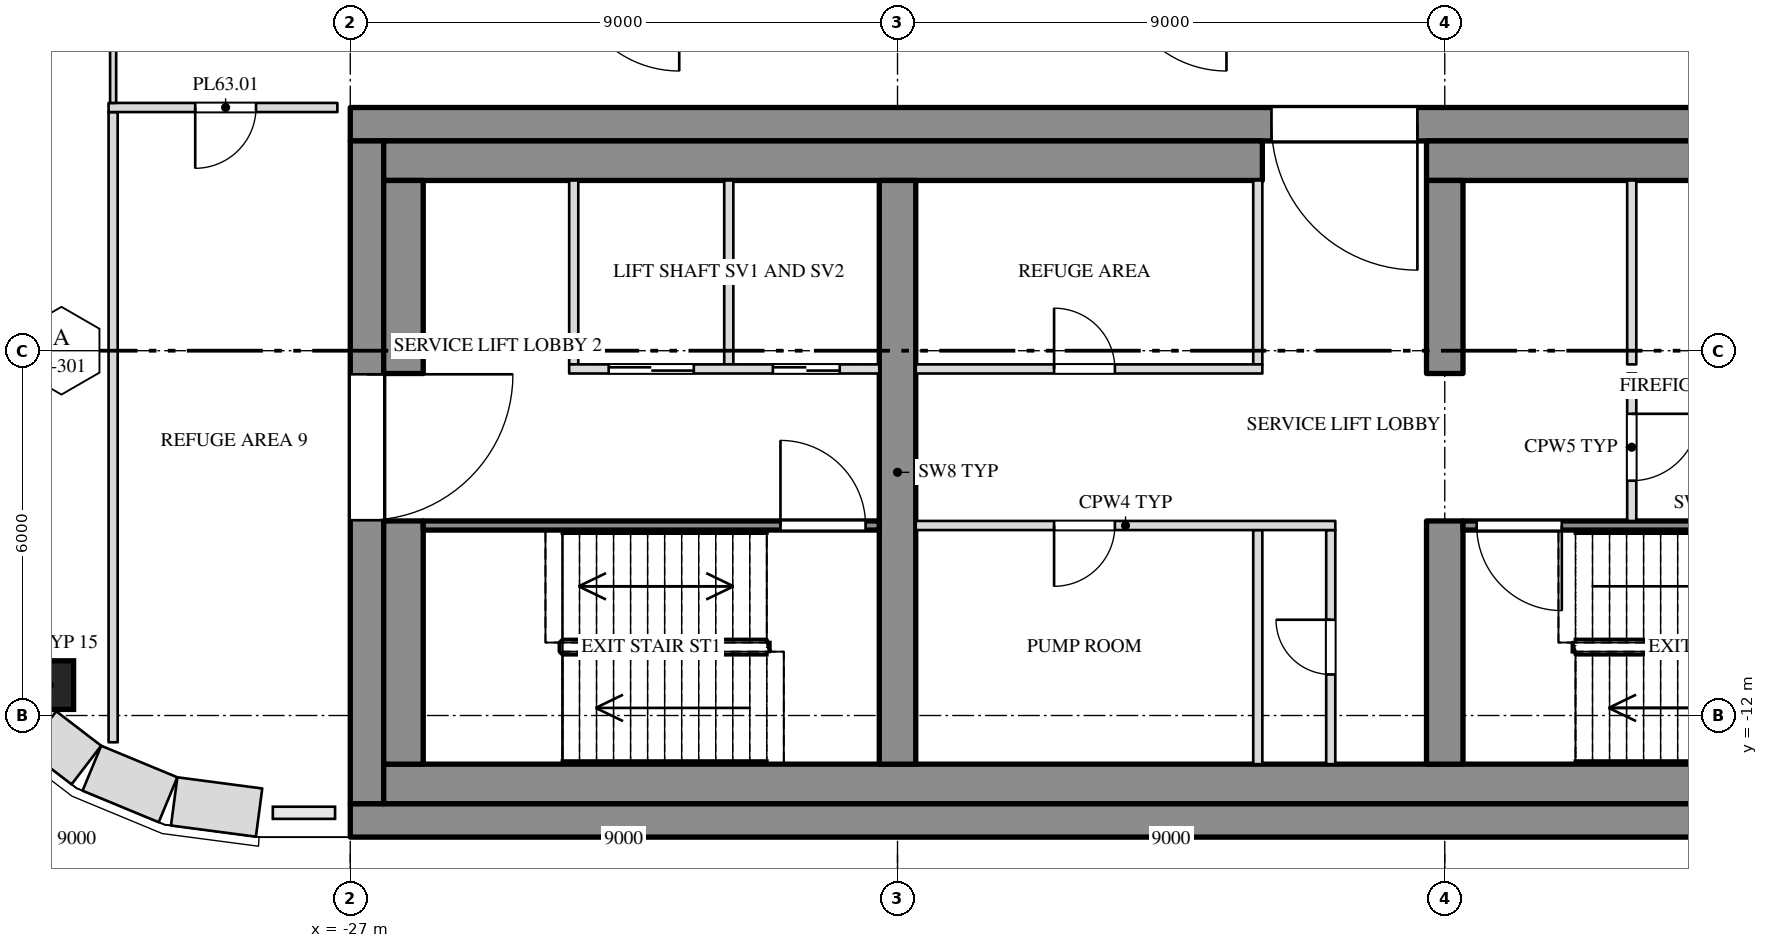
"""IFC4 building model, lengths in metres.
Left out: names, types, materials, properties, quantities, classifications, styles, units other than length and angle.
Written with IfcOpenShell. Run it as: python <this file> out.ifc"""

import sys

from ifc_helpers import new_model, si_unit, direction, frame, frame_2d, origin, origin_2d, place, context, subcontext, project, spatial, rectangle, extrude, element, fill, save


model = new_model("IFC4")
c1 = context("Model", 3, precision=1e-05, world=origin(), true_north=direction((0.0, 1.0)))
c2 = subcontext(c1, "Body", "Model", "MODEL_VIEW")
j1 = project(units=[si_unit("LENGTHUNIT", "METRE"), si_unit("PLANEANGLEUNIT", "RADIAN")], contexts=[c1])
p1 = place(None, origin())
s1 = spatial("IfcSite", under=j1, at=p1, CompositionType="ELEMENT")
p2 = place(p1, origin())
s2 = spatial("IfcBuilding", under=s1, at=p2, CompositionType="ELEMENT")
p3 = place(p2, frame((0.0, 0.0, 268.5)))
s3 = spatial("IfcBuildingStorey", under=s2, at=p3, CompositionType="ELEMENT", Elevation=268.5)
p4 = place(p3, frame((-31.95, -11.5, 0.0), z_axis=(0.0, 0.0, 1.0), x_axis=(1.0, 0.0, 0.0)))
e1 = element("IfcColumn", 1, at=p4, inside=s3, PredefinedType="COLUMN", context=c2, shape_type="SweptSolid", body=[
    extrude(rectangle(XDim=0.8, YDim=0.8, at=origin_2d()), origin(), (0.0, 0.0, 1.0), 4.0),
])
p5 = place(p3, frame((-27.0, -2.275, 0.0), z_axis=(0.0, 0.0, 1.0), x_axis=(1.0, 0.0, 0.0)))
e2 = element("IfcWall", 2, at=p5, inside=s3, PredefinedType="SHEAR", context=c2, shape_type="SweptSolid", body=[
    extrude(rectangle(XDim=54.0, YDim=0.55, at=frame_2d((27.0, 0.0))), origin(), (0.0, 0.0, 1.0), 3.78),
])
p6 = place(p5, frame((15.15, 0.0, 0.0)))
e3 = element("IfcOpeningElement", 3, at=p6, cuts=e2, PredefinedType="OPENING", context=c2, shape_type="SweptSolid", body=[
    extrude(rectangle(XDim=2.4, YDim=2.1, at=frame_2d((1.2, 1.05))), frame((0.0, 0.287, 0.0), z_axis=(0.0, -1.0, 0.0), x_axis=(1.0, 0.0, 0.0)), (0.0, 0.0, 1.0), 0.574),
])
p7 = place(p5, frame((36.45, 0.0, 0.0)))
e4 = element("IfcOpeningElement", 4, at=p7, cuts=e2, PredefinedType="OPENING", context=c2, shape_type="SweptSolid", body=[
    extrude(rectangle(XDim=2.4, YDim=2.1, at=frame_2d((1.2, 1.05))), frame((0.0, 0.287, 0.0), z_axis=(0.0, -1.0, 0.0), x_axis=(1.0, 0.0, 0.0)), (0.0, 0.0, 1.0), 0.574),
])
p8 = place(p3, frame((-27.0, -13.725, 0.0), z_axis=(0.0, 0.0, 1.0), x_axis=(1.0, 0.0, 0.0)))
e5 = element("IfcWall", 5, at=p8, inside=s3, PredefinedType="SHEAR", context=c2, shape_type="SweptSolid", body=[
    extrude(rectangle(XDim=54.0, YDim=0.55, at=frame_2d((27.0, 0.0))), origin(), (0.0, 0.0, 1.0), 3.78),
])
p9 = place(p3, frame((-26.725, -13.45, 0.0), z_axis=(0.0, 0.0, 1.0), x_axis=(0.0, 1.0, 0.0)))
e6 = element("IfcWall", 6, at=p9, inside=s3, PredefinedType="SHEAR", context=c2, shape_type="SweptSolid", body=[
    extrude(rectangle(XDim=10.9, YDim=0.55, at=frame_2d((5.45, 0.0))), origin(), (0.0, 0.0, 1.0), 3.78),
])
p10 = place(p9, frame((4.662, 0.0, 0.0)))
e7 = element("IfcOpeningElement", 7, at=p10, cuts=e6, PredefinedType="OPENING", context=c2, shape_type="SweptSolid", body=[
    extrude(rectangle(XDim=2.4, YDim=2.1, at=frame_2d((1.2, 1.05))), frame((0.0, 0.287, 0.0), z_axis=(0.0, -1.0, 0.0), x_axis=(1.0, 0.0, 0.0)), (0.0, 0.0, 1.0), 0.574),
])
p11 = place(p3, frame((-26.45, -2.875, 0.0), z_axis=(0.0, 0.0, 1.0), x_axis=(1.0, 0.0, 0.0)))
e8 = element("IfcWall", 8, at=p11, inside=s3, PredefinedType="SHEAR", context=c2, shape_type="SweptSolid", body=[
    extrude(rectangle(XDim=14.45, YDim=0.65, at=frame_2d((7.225, 0.0))), origin(), (0.0, 0.0, 1.0), 3.78),
])
p12 = place(p3, frame((-9.3, -2.875, 0.0), z_axis=(0.0, 0.0, 1.0), x_axis=(1.0, 0.0, 0.0)))
e9 = element("IfcWall", 9, at=p12, inside=s3, PredefinedType="SHEAR", context=c2, shape_type="SweptSolid", body=[
    extrude(rectangle(XDim=18.6, YDim=0.65, at=frame_2d((9.3, 0.0))), origin(), (0.0, 0.0, 1.0), 3.78),
])
p13 = place(p3, frame((-26.45, -13.125, 0.0), z_axis=(0.0, 0.0, 1.0), x_axis=(1.0, 0.0, 0.0)))
e10 = element("IfcWall", 10, at=p13, inside=s3, PredefinedType="SHEAR", context=c2, shape_type="SweptSolid", body=[
    extrude(rectangle(XDim=52.9, YDim=0.65, at=frame_2d((26.45, 0.0))), origin(), (0.0, 0.0, 1.0), 3.78),
])
p14 = place(p3, frame((-26.125, -12.8, 0.0), z_axis=(0.0, 0.0, 1.0), x_axis=(0.0, 1.0, 0.0)))
e11 = element("IfcWall", 11, at=p14, inside=s3, PredefinedType="SHEAR", context=c2, shape_type="SweptSolid", body=[
    extrude(rectangle(XDim=4.0, YDim=0.65, at=frame_2d((2.0, 0.0))), origin(), (0.0, 0.0, 1.0), 3.78),
])
p15 = place(p3, frame((-26.125, -6.375, 0.0), z_axis=(0.0, 0.0, 1.0), x_axis=(0.0, 1.0, 0.0)))
e12 = element("IfcWall", 12, at=p15, inside=s3, PredefinedType="SHEAR", context=c2, shape_type="SweptSolid", body=[
    extrude(rectangle(XDim=3.175, YDim=0.65, at=frame_2d((1.587, 0.0))), origin(), (0.0, 0.0, 1.0), 3.78),
])
p16 = place(p3, frame((-18.0, -12.8, 0.0), z_axis=(0.0, 0.0, 1.0), x_axis=(0.0, 1.0, 0.0)))
e13 = element("IfcWall", 13, at=p16, inside=s3, PredefinedType="SHEAR", context=c2, shape_type="SweptSolid", body=[
    extrude(rectangle(XDim=9.6, YDim=0.6, at=frame_2d((4.8, 0.0))), origin(), (0.0, 0.0, 1.0), 3.78),
])
p17 = place(p3, frame((-9.0, -12.8, 0.0), z_axis=(0.0, 0.0, 1.0), x_axis=(0.0, 1.0, 0.0)))
e14 = element("IfcWall", 14, at=p17, inside=s3, PredefinedType="SHEAR", context=c2, shape_type="SweptSolid", body=[
    extrude(rectangle(XDim=4.0, YDim=0.6, at=frame_2d((2.0, 0.0))), origin(), (0.0, 0.0, 1.0), 3.78),
])
p18 = place(p3, frame((-9.0, -6.375, 0.0), z_axis=(0.0, 0.0, 1.0), x_axis=(0.0, 1.0, 0.0)))
e15 = element("IfcWall", 15, at=p18, inside=s3, PredefinedType="SHEAR", context=c2, shape_type="SweptSolid", body=[
    extrude(rectangle(XDim=3.175, YDim=0.6, at=frame_2d((1.587, 0.0))), origin(), (0.0, 0.0, 1.0), 3.78),
])
p19 = place(p3, frame((-30.9, -12.44, 0.0), z_axis=(0.0, 0.0, 1.0), x_axis=(0.0, 1.0, 0.0)))
e16 = element("IfcWall", 16, at=p19, inside=s3, PredefinedType="PARTITIONING", context=c2, shape_type="SweptSolid", body=[
    extrude(rectangle(XDim=10.365, YDim=0.15, at=frame_2d((5.183, 0.0))), origin(), (0.0, 0.0, 1.0), 3.78),
])
p20 = place(p3, frame((-30.975, -2.0, 0.0), z_axis=(0.0, 0.0, 1.0), x_axis=(1.0, 0.0, 0.0)))
e17 = element("IfcWall", 17, at=p20, inside=s3, PredefinedType="PARTITIONING", context=c2, shape_type="SweptSolid", body=[
    extrude(rectangle(XDim=3.763, YDim=0.15, at=frame_2d((1.882, 0.0))), origin(), (0.0, 0.0, 1.0), 3.78),
])
p21 = place(p20, frame((1.425, 0.0, 0.0)))
e18 = element("IfcOpeningElement", 18, at=p21, cuts=e17, PredefinedType="OPENING", context=c2, shape_type="SweptSolid", body=[
    extrude(rectangle(XDim=1.0, YDim=2.1, at=frame_2d((0.5, 1.05))), frame((0.0, 0.087, 0.0), z_axis=(0.0, -1.0, 0.0), x_axis=(1.0, 0.0, 0.0)), (0.0, 0.0, 1.0), 0.174),
])
p22 = place(p3, frame((-30.9, -1.925, 0.0), z_axis=(0.0, 0.0, 1.0), x_axis=(0.0, 1.0, 0.0)))
e19 = element("IfcWall", 19, at=p22, inside=s3, PredefinedType="PARTITIONING", context=c2, shape_type="SweptSolid", body=[
    extrude(rectangle(XDim=2.25, YDim=0.1, at=frame_2d((1.125, 0.0))), origin(), (0.0, 0.0, 1.0), 3.78),
])
p23 = place(p3, frame((-32.079, -12.248, 0.0), z_axis=(0.0, 0.0, 1.0), x_axis=(0.793344662299, -0.608772738221, 0.0)))
e20 = element("IfcWall", 20, at=p23, inside=s3, PredefinedType="SOLIDWALL", context=c2, shape_type="SweptSolid", body=[
    extrude(rectangle(XDim=0.931, YDim=0.8, at=frame_2d((0.466, 0.0))), origin(), (0.0, 0.0, 1.0), 3.78),
])
p24 = place(p3, frame((-31.25, -12.867, 0.0), z_axis=(0.0, 0.0, 1.0), x_axis=(0.923847774587, -0.38276009378, 0.0)))
e21 = element("IfcWall", 21, at=p24, inside=s3, PredefinedType="SOLIDWALL", context=c2, shape_type="SweptSolid", body=[
    extrude(rectangle(XDim=1.355, YDim=0.8, at=frame_2d((0.678, 0.0))), origin(), (0.0, 0.0, 1.0), 3.78),
])
p25 = place(p3, frame((-29.896, -13.413, 0.0), z_axis=(0.0, 0.0, 1.0), x_axis=(0.99144603414, -0.130517283865, 0.0)))
e22 = element("IfcWall", 22, at=p25, inside=s3, PredefinedType="SOLIDWALL", context=c2, shape_type="SweptSolid", body=[
    extrude(rectangle(XDim=1.408, YDim=0.8, at=frame_2d((0.704, 0.0))), origin(), (0.0, 0.0, 1.0), 3.78),
])
for number, where, z_axis, x_axis in (
    (23, (-20.775, -6.225, 0.0), (0.0, 0.0, 1.0), (0.0, 1.0, 0.0)),
    (24, (-23.325, -6.225, 0.0), (0.0, 0.0, 1.0), (0.0, 1.0, 0.0)),
    (25, (-12.075, -6.225, 0.0), (0.0, 0.0, 1.0), (0.0, 1.0, 0.0)),
    (26, (-5.925, -6.225, 0.0), (0.0, 0.0, 1.0), (0.0, 1.0, 0.0)),
):
    element("IfcWall", number, at=place(p3, frame(where, z_axis=z_axis, x_axis=x_axis)), inside=s3, PredefinedType="PARTITIONING", context=c2, shape_type="SweptSolid", body=[
        extrude(rectangle(XDim=3.025, YDim=0.15, at=frame_2d((1.513, 0.0))), origin(), (0.0, 0.0, 1.0), 3.78),
    ])
p26 = place(p3, frame((-10.875, -12.8, 0.0), z_axis=(0.0, 0.0, 1.0), x_axis=(0.0, 1.0, 0.0)))
e27 = element("IfcWall", 27, at=p26, inside=s3, PredefinedType="PARTITIONING", context=c2, shape_type="SweptSolid", body=[
    extrude(rectangle(XDim=3.85, YDim=0.15, at=frame_2d((1.925, 0.0))), origin(), (0.0, 0.0, 1.0), 3.78),
])
p27 = place(p26, frame((1.475, 0.0, 0.0)))
e28 = element("IfcOpeningElement", 28, at=p27, cuts=e27, PredefinedType="OPENING", context=c2, shape_type="SweptSolid", body=[
    extrude(rectangle(XDim=0.9, YDim=2.1, at=frame_2d((0.45, 1.05))), frame((0.0, 0.087, 0.0), z_axis=(0.0, -1.0, 0.0), x_axis=(1.0, 0.0, 0.0)), (0.0, 0.0, 1.0), 0.174),
])
p28 = place(p3, frame((-12.075, -12.8, 0.0), z_axis=(0.0, 0.0, 1.0), x_axis=(0.0, 1.0, 0.0)))
e29 = element("IfcWall", 29, at=p28, inside=s3, PredefinedType="PARTITIONING", context=c2, shape_type="SweptSolid", body=[
    extrude(rectangle(XDim=3.85, YDim=0.15, at=frame_2d((1.925, 0.0))), origin(), (0.0, 0.0, 1.0), 3.78),
])
p29 = place(p3, frame((-5.925, -8.8, 0.0), z_axis=(0.0, 0.0, 1.0), x_axis=(0.0, 1.0, 0.0)))
e30 = element("IfcWall", 30, at=p29, inside=s3, PredefinedType="PARTITIONING", context=c2, shape_type="SweptSolid", body=[
    extrude(rectangle(XDim=2.425, YDim=0.15, at=frame_2d((1.212, 0.0))), origin(), (0.0, 0.0, 1.0), 3.78),
])
p30 = place(p29, frame((0.662, 0.0, 0.0)))
e31 = element("IfcOpeningElement", 31, at=p30, cuts=e30, PredefinedType="OPENING", context=c2, shape_type="SweptSolid", body=[
    extrude(rectangle(XDim=1.1, YDim=2.1, at=frame_2d((0.55, 1.05))), frame((0.0, 0.087, 0.0), z_axis=(0.0, -1.0, 0.0), x_axis=(1.0, 0.0, 0.0)), (0.0, 0.0, 1.0), 0.174),
])
p31 = place(p3, frame((-23.4, -6.3, 0.0), z_axis=(0.0, 0.0, 1.0), x_axis=(1.0, 0.0, 0.0)))
e32 = element("IfcWall", 32, at=p31, inside=s3, PredefinedType="PARTITIONING", context=c2, shape_type="SweptSolid", body=[
    extrude(rectangle(XDim=5.1, YDim=0.15, at=frame_2d((2.55, 0.0))), origin(), (0.0, 0.0, 1.0), 3.78),
])
p32 = place(p31, frame((0.65, 0.0, 0.0)))
e33 = element("IfcOpeningElement", 33, at=p32, cuts=e32, PredefinedType="OPENING", context=c2, shape_type="SweptSolid", body=[
    extrude(rectangle(XDim=1.4, YDim=2.1, at=frame_2d((0.7, 1.05))), frame((0.0, 0.087, 0.0), z_axis=(0.0, -1.0, 0.0), x_axis=(1.0, 0.0, 0.0)), (0.0, 0.0, 1.0), 0.174),
])
p33 = place(p31, frame((3.35, 0.0, 0.0)))
e34 = element("IfcOpeningElement", 34, at=p33, cuts=e32, PredefinedType="OPENING", context=c2, shape_type="SweptSolid", body=[
    extrude(rectangle(XDim=1.1, YDim=2.1, at=frame_2d((0.55, 1.05))), frame((0.0, 0.087, 0.0), z_axis=(0.0, -1.0, 0.0), x_axis=(1.0, 0.0, 0.0)), (0.0, 0.0, 1.0), 0.174),
])
p34 = place(p3, frame((-17.7, -6.3, 0.0), z_axis=(0.0, 0.0, 1.0), x_axis=(1.0, 0.0, 0.0)))
e35 = element("IfcWall", 35, at=p34, inside=s3, PredefinedType="PARTITIONING", context=c2, shape_type="SweptSolid", body=[
    extrude(rectangle(XDim=5.7, YDim=0.15, at=frame_2d((2.85, 0.0))), origin(), (0.0, 0.0, 1.0), 3.78),
])
p35 = place(p34, frame((2.275, 0.0, 0.0)))
e36 = element("IfcOpeningElement", 36, at=p35, cuts=e35, PredefinedType="OPENING", context=c2, shape_type="SweptSolid", body=[
    extrude(rectangle(XDim=1.0, YDim=2.1, at=frame_2d((0.5, 1.05))), frame((0.0, 0.087, 0.0), z_axis=(0.0, -1.0, 0.0), x_axis=(1.0, 0.0, 0.0)), (0.0, 0.0, 1.0), 0.174),
])
p36 = place(p3, frame((-25.8, -8.875, 0.0), z_axis=(0.0, 0.0, 1.0), x_axis=(1.0, 0.0, 0.0)))
e37 = element("IfcWall", 37, at=p36, inside=s3, PredefinedType="SHEAR", context=c2, shape_type="SweptSolid", body=[
    extrude(rectangle(XDim=7.5, YDim=0.15, at=frame_2d((3.75, 0.0))), origin(), (0.0, 0.0, 1.0), 3.78),
])
p37 = place(p36, frame((5.875, 0.0, 0.0)))
e38 = element("IfcOpeningElement", 38, at=p37, cuts=e37, PredefinedType="OPENING", context=c2, shape_type="SweptSolid", body=[
    extrude(rectangle(XDim=1.4, YDim=2.1, at=frame_2d((0.7, 1.05))), frame((0.0, 0.087, 0.0), z_axis=(0.0, -1.0, 0.0), x_axis=(1.0, 0.0, 0.0)), (0.0, 0.0, 1.0), 0.174),
])
p38 = place(p3, frame((-17.7, -8.875, 0.0), z_axis=(0.0, 0.0, 1.0), x_axis=(1.0, 0.0, 0.0)))
e39 = element("IfcWall", 39, at=p38, inside=s3, PredefinedType="PARTITIONING", context=c2, shape_type="SweptSolid", body=[
    extrude(rectangle(XDim=6.9, YDim=0.15, at=frame_2d((3.45, 0.0))), origin(), (0.0, 0.0, 1.0), 3.78),
])
p39 = place(p38, frame((2.275, 0.0, 0.0)))
e40 = element("IfcOpeningElement", 40, at=p39, cuts=e39, PredefinedType="OPENING", context=c2, shape_type="SweptSolid", body=[
    extrude(rectangle(XDim=1.0, YDim=2.1, at=frame_2d((0.5, 1.05))), frame((0.0, 0.087, 0.0), z_axis=(0.0, -1.0, 0.0), x_axis=(1.0, 0.0, 0.0)), (0.0, 0.0, 1.0), 0.174),
])
p40 = place(p3, frame((-8.7, -8.875, 0.0), z_axis=(0.0, 0.0, 1.0), x_axis=(1.0, 0.0, 0.0)))
e41 = element("IfcWall", 41, at=p40, inside=s3, PredefinedType="SHEAR", context=c2, shape_type="SweptSolid", body=[
    extrude(rectangle(XDim=8.4, YDim=0.15, at=frame_2d((4.2, 0.0))), origin(), (0.0, 0.0, 1.0), 3.78),
])
p41 = place(p40, frame((0.225, 0.0, 0.0)))
e42 = element("IfcOpeningElement", 42, at=p41, cuts=e41, PredefinedType="OPENING", context=c2, shape_type="SweptSolid", body=[
    extrude(rectangle(XDim=1.4, YDim=2.1, at=frame_2d((0.7, 1.05))), frame((0.0, 0.087, 0.0), z_axis=(0.0, -1.0, 0.0), x_axis=(1.0, 0.0, 0.0)), (0.0, 0.0, 1.0), 0.174),
])
p42 = place(p21, origin())
e43 = element("IfcDoor", 43, at=p42, inside=s3, OperationType="SINGLE_SWING_RIGHT", PredefinedType="DOOR", context=c2, shape_type="SweptSolid", body=[
    extrude(rectangle(XDim=1.0, YDim=2.1, at=frame_2d((0.5, 1.05))), frame((0.0, 0.025, 0.0), z_axis=(0.0, -1.0, 0.0), x_axis=(1.0, 0.0, 0.0)), (0.0, 0.0, 1.0), 0.05),
])
fill(e18, e43)
p43 = place(p10, origin())
e44 = element("IfcDoor", 44, at=p43, inside=s3, OperationType="DOUBLE_DOOR_SINGLE_SWING", PredefinedType="DOOR", context=c2, shape_type="SweptSolid", body=[
    extrude(rectangle(XDim=2.4, YDim=2.1, at=frame_2d((1.2, 1.05))), frame((0.0, 0.025, 0.0), z_axis=(0.0, -1.0, 0.0), x_axis=(1.0, 0.0, 0.0)), (0.0, 0.0, 1.0), 0.05),
])
fill(e7, e44)
p44 = place(p32, origin())
e45 = element("IfcDoor", 45, at=p44, inside=s3, OperationType="SLIDING_TO_RIGHT", PredefinedType="DOOR", context=c2, shape_type="SweptSolid", body=[
    extrude(rectangle(XDim=1.4, YDim=2.1, at=frame_2d((0.7, 1.05))), frame((0.0, 0.025, 0.0), z_axis=(0.0, -1.0, 0.0), x_axis=(1.0, 0.0, 0.0)), (0.0, 0.0, 1.0), 0.05),
])
fill(e33, e45)
p45 = place(p33, origin())
e46 = element("IfcDoor", 46, at=p45, inside=s3, OperationType="SLIDING_TO_LEFT", PredefinedType="DOOR", context=c2, shape_type="SweptSolid", body=[
    extrude(rectangle(XDim=1.1, YDim=2.1, at=frame_2d((0.55, 1.05))), frame((0.0, 0.025, 0.0), z_axis=(0.0, -1.0, 0.0), x_axis=(1.0, 0.0, 0.0)), (0.0, 0.0, 1.0), 0.05),
])
fill(e34, e46)
p46 = place(p37, origin())
e47 = element("IfcDoor", 47, at=p46, inside=s3, OperationType="DOUBLE_DOOR_SINGLE_SWING", PredefinedType="DOOR", context=c2, shape_type="SweptSolid", body=[
    extrude(rectangle(XDim=1.4, YDim=2.1, at=frame_2d((0.7, 1.05))), frame((0.0, 0.025, 0.0), z_axis=(0.0, -1.0, 0.0), x_axis=(1.0, 0.0, 0.0)), (0.0, 0.0, 1.0), 0.05),
])
fill(e38, e47)
p47 = place(p39, origin())
e48 = element("IfcDoor", 48, at=p47, inside=s3, OperationType="SINGLE_SWING_RIGHT", PredefinedType="DOOR", context=c2, shape_type="SweptSolid", body=[
    extrude(rectangle(XDim=1.0, YDim=2.1, at=frame_2d((0.5, 1.05))), frame((0.0, 0.025, 0.0), z_axis=(0.0, -1.0, 0.0), x_axis=(1.0, 0.0, 0.0)), (0.0, 0.0, 1.0), 0.05),
])
fill(e40, e48)
p48 = place(p35, origin())
e49 = element("IfcDoor", 49, at=p48, inside=s3, OperationType="SINGLE_SWING_LEFT", PredefinedType="DOOR", context=c2, shape_type="SweptSolid", body=[
    extrude(rectangle(XDim=1.0, YDim=2.1, at=frame_2d((0.5, 1.05))), frame((0.0, 0.025, 0.0), z_axis=(0.0, -1.0, 0.0), x_axis=(1.0, 0.0, 0.0)), (0.0, 0.0, 1.0), 0.05),
])
fill(e36, e49)
p49 = place(p27, origin())
e50 = element("IfcDoor", 50, at=p49, inside=s3, OperationType="SINGLE_SWING_RIGHT", PredefinedType="DOOR", context=c2, shape_type="SweptSolid", body=[
    extrude(rectangle(XDim=0.9, YDim=2.1, at=frame_2d((0.45, 1.05))), frame((0.0, 0.025, 0.0), z_axis=(0.0, -1.0, 0.0), x_axis=(1.0, 0.0, 0.0)), (0.0, 0.0, 1.0), 0.05),
])
fill(e28, e50)
p50 = place(p6, origin())
e51 = element("IfcDoor", 51, at=p50, inside=s3, OperationType="DOUBLE_DOOR_SINGLE_SWING", PredefinedType="DOOR", context=c2, shape_type="SweptSolid", body=[
    extrude(rectangle(XDim=2.4, YDim=2.1, at=frame_2d((1.2, 1.05))), frame((0.0, 0.025, 0.0), z_axis=(0.0, -1.0, 0.0), x_axis=(1.0, 0.0, 0.0)), (0.0, 0.0, 1.0), 0.05),
])
fill(e3, e51)
p51 = place(p41, origin())
e52 = element("IfcDoor", 52, at=p51, inside=s3, OperationType="DOUBLE_DOOR_SINGLE_SWING", PredefinedType="DOOR", context=c2, shape_type="SweptSolid", body=[
    extrude(rectangle(XDim=1.4, YDim=2.1, at=frame_2d((0.7, 1.05))), frame((0.0, 0.025, 0.0), z_axis=(0.0, -1.0, 0.0), x_axis=(1.0, 0.0, 0.0)), (0.0, 0.0, 1.0), 0.05),
])
fill(e42, e52)
p52 = place(p30, origin())
e53 = element("IfcDoor", 53, at=p52, inside=s3, OperationType="SINGLE_SWING_LEFT", PredefinedType="DOOR", context=c2, shape_type="SweptSolid", body=[
    extrude(rectangle(XDim=1.1, YDim=2.1, at=frame_2d((0.55, 1.05))), frame((0.0, 0.025, 0.0), z_axis=(0.0, -1.0, 0.0), x_axis=(1.0, 0.0, 0.0)), (0.0, 0.0, 1.0), 0.05),
])
fill(e31, e53)
save(model, sys.argv[1])
